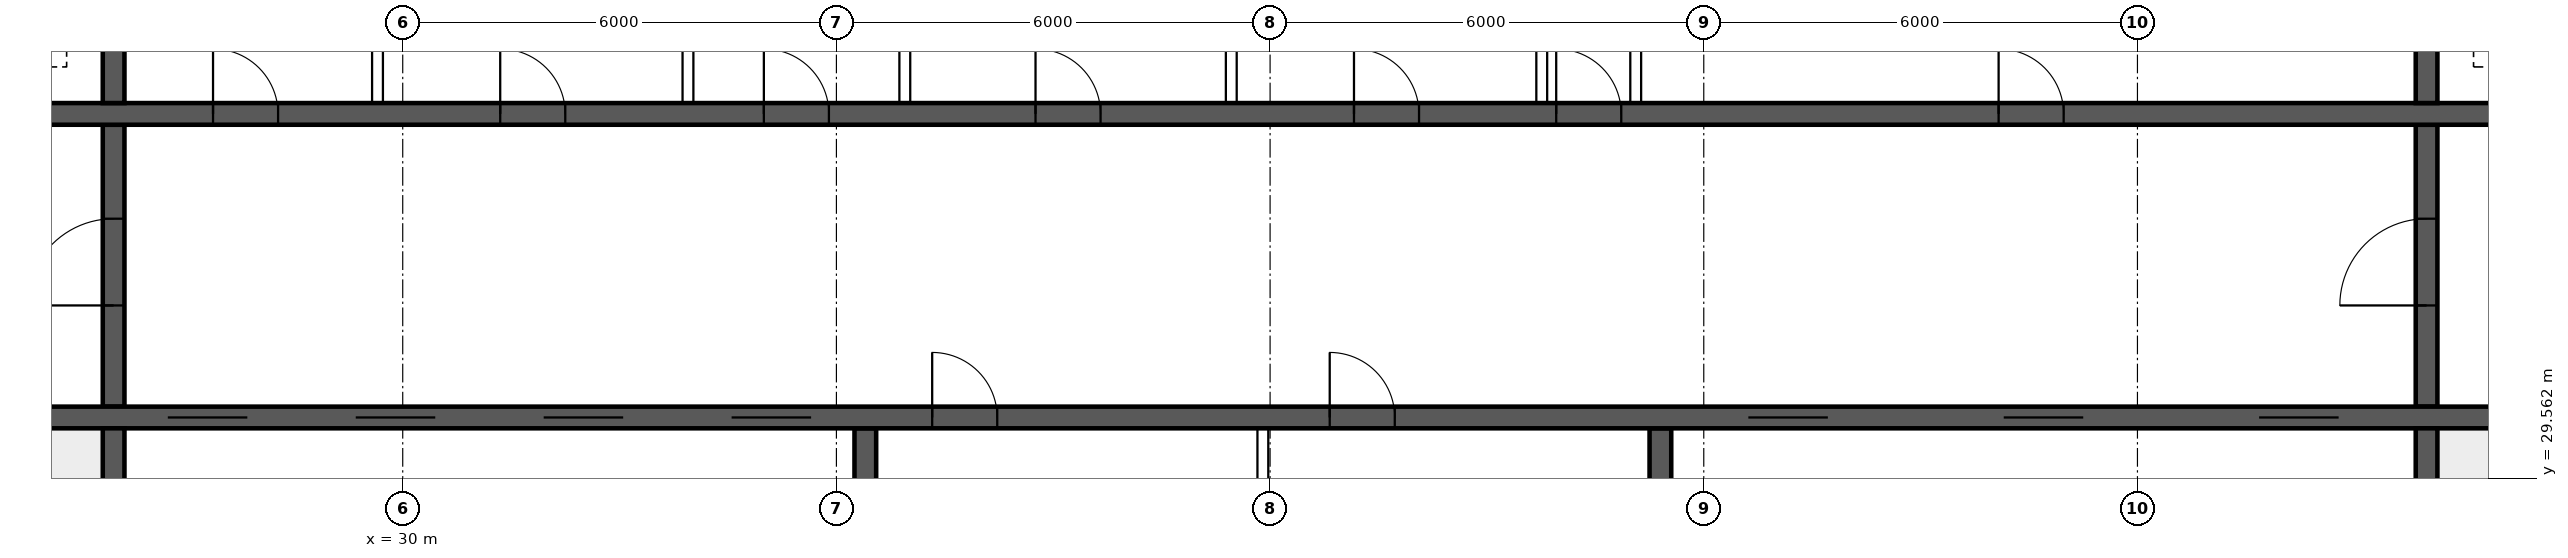
"""IFC4 building model, lengths in metres.
Left out: names, types, materials, properties, quantities, classifications, styles, units other than length and angle.
Written with IfcOpenShell. Run it as: python <this file> out.ifc"""

import sys

from ifc_helpers import new_model, si_unit, direction, frame, frame_2d, origin, place, context, subcontext, project, spatial, rectangle, extrude, element, fill, save


model = new_model("IFC4")
c1 = context("Model", 3, precision=1e-05, world=origin(), true_north=direction((0.0, 1.0)))
c2 = subcontext(c1, "Body", "Model", "MODEL_VIEW")
j1 = project(units=[si_unit("LENGTHUNIT", "METRE"), si_unit("PLANEANGLEUNIT", "RADIAN")], contexts=[c1])
p1 = place(None, origin())
s1 = spatial("IfcSite", under=j1, at=p1, CompositionType="ELEMENT")
p2 = place(p1, origin())
s2 = spatial("IfcBuilding", under=s1, at=p2, CompositionType="ELEMENT")
p3 = place(p2, frame((0.0, 0.0, 227.8)))
s3 = spatial("IfcBuildingStorey", under=s2, at=p3, CompositionType="ELEMENT", Elevation=227.8)
p4 = place(p3, frame((18.35, 30.4, 0.0), z_axis=(0.0, 0.0, 1.0), x_axis=(1.0, 0.0, 0.0)))
e1 = element("IfcWall", 1, at=p4, inside=s3, PredefinedType="SHEAR", context=c2, shape_type="SweptSolid", body=[
    extrude(rectangle(XDim=47.3, YDim=0.3, at=frame_2d((23.65, 0.0))), origin(), (0.0, 0.0, 1.0), 3.75),
])
p5 = place(p4, frame((0.4, 0.0, 0.0)))
e2 = element("IfcOpeningElement", 2, at=p5, cuts=e1, PredefinedType="OPENING", context=c2, shape_type="SweptSolid", body=[
    extrude(rectangle(XDim=1.0, YDim=2.1, at=frame_2d((0.5, 1.05))), frame((0.0, 0.16, 0.0), z_axis=(0.0, -1.0, 0.0), x_axis=(1.0, 0.0, 0.0)), (0.0, 0.0, 1.0), 0.32),
])
p6 = place(p4, frame((45.9, 0.0, 0.0)))
e3 = element("IfcOpeningElement", 3, at=p6, cuts=e1, PredefinedType="OPENING", context=c2, shape_type="SweptSolid", body=[
    extrude(rectangle(XDim=1.0, YDim=2.1, at=frame_2d((0.5, 1.05))), frame((0.0, 0.16, 0.0), z_axis=(0.0, -1.0, 0.0), x_axis=(1.0, 0.0, 0.0)), (0.0, 0.0, 1.0), 0.32),
])
p7 = place(p4, frame((8.4, 0.0, 0.0)))
e4 = element("IfcOpeningElement", 4, at=p7, cuts=e1, PredefinedType="OPENING", context=c2, shape_type="SweptSolid", body=[
    extrude(rectangle(XDim=1.1, YDim=2.1, at=frame_2d((0.55, 1.05))), frame((0.0, 0.16, 0.0), z_axis=(0.0, -1.0, 0.0), x_axis=(1.0, 0.0, 0.0)), (0.0, 0.0, 1.0), 0.32),
])
p8 = place(p4, frame((11.0, 0.0, 0.0)))
e5 = element("IfcOpeningElement", 5, at=p8, cuts=e1, PredefinedType="OPENING", context=c2, shape_type="SweptSolid", body=[
    extrude(rectangle(XDim=1.1, YDim=2.1, at=frame_2d((0.55, 1.05))), frame((0.0, 0.16, 0.0), z_axis=(0.0, -1.0, 0.0), x_axis=(1.0, 0.0, 0.0)), (0.0, 0.0, 1.0), 0.32),
])
p9 = place(p4, frame((13.6, 0.0, 0.0)))
e6 = element("IfcOpeningElement", 6, at=p9, cuts=e1, PredefinedType="OPENING", context=c2, shape_type="SweptSolid", body=[
    extrude(rectangle(XDim=1.1, YDim=2.1, at=frame_2d((0.55, 1.05))), frame((0.0, 0.16, 0.0), z_axis=(0.0, -1.0, 0.0), x_axis=(1.0, 0.0, 0.0)), (0.0, 0.0, 1.0), 0.32),
])
p10 = place(p4, frame((16.2, 0.0, 0.0)))
e7 = element("IfcOpeningElement", 7, at=p10, cuts=e1, PredefinedType="OPENING", context=c2, shape_type="SweptSolid", body=[
    extrude(rectangle(XDim=1.1, YDim=2.1, at=frame_2d((0.55, 1.05))), frame((0.0, 0.16, 0.0), z_axis=(0.0, -1.0, 0.0), x_axis=(1.0, 0.0, 0.0)), (0.0, 0.0, 1.0), 0.32),
])
p11 = place(p4, frame((18.975, 0.0, 0.0)))
e8 = element("IfcOpeningElement", 8, at=p11, cuts=e1, PredefinedType="OPENING", context=c2, shape_type="SweptSolid", body=[
    extrude(rectangle(XDim=0.9, YDim=2.1, at=frame_2d((0.45, 1.05))), frame((0.0, 0.16, 0.0), z_axis=(0.0, -1.0, 0.0), x_axis=(1.0, 0.0, 0.0)), (0.0, 0.0, 1.0), 0.32),
])
p12 = place(p4, frame((24.475, 0.0, 0.0)))
e9 = element("IfcOpeningElement", 9, at=p12, cuts=e1, PredefinedType="OPENING", context=c2, shape_type="SweptSolid", body=[
    extrude(rectangle(XDim=0.9, YDim=2.1, at=frame_2d((0.45, 1.05))), frame((0.0, 0.16, 0.0), z_axis=(0.0, -1.0, 0.0), x_axis=(1.0, 0.0, 0.0)), (0.0, 0.0, 1.0), 0.32),
])
p13 = place(p4, frame((30.267, 0.0, 0.0)))
e10 = element("IfcOpeningElement", 10, at=p13, cuts=e1, PredefinedType="OPENING", context=c2, shape_type="SweptSolid", body=[
    extrude(rectangle(XDim=1.1, YDim=2.1, at=frame_2d((0.55, 1.05))), frame((0.0, 0.16, 0.0), z_axis=(0.0, -1.0, 0.0), x_axis=(1.0, 0.0, 0.0)), (0.0, 0.0, 1.0), 0.32),
])
p14 = place(p4, frame((33.8, 0.0, 0.0)))
e11 = element("IfcOpeningElement", 11, at=p14, cuts=e1, PredefinedType="OPENING", context=c2, shape_type="SweptSolid", body=[
    extrude(rectangle(XDim=1.1, YDim=2.1, at=frame_2d((0.55, 1.05))), frame((0.0, 0.16, 0.0), z_axis=(0.0, -1.0, 0.0), x_axis=(1.0, 0.0, 0.0)), (0.0, 0.0, 1.0), 0.32),
])
p15 = place(p4, frame((37.333, 0.0, 0.0)))
e12 = element("IfcOpeningElement", 12, at=p15, cuts=e1, PredefinedType="OPENING", context=c2, shape_type="SweptSolid", body=[
    extrude(rectangle(XDim=1.1, YDim=2.1, at=frame_2d((0.55, 1.05))), frame((0.0, 0.16, 0.0), z_axis=(0.0, -1.0, 0.0), x_axis=(1.0, 0.0, 0.0)), (0.0, 0.0, 1.0), 0.32),
])
p16 = place(p3, frame((18.35, 34.6, 0.0), z_axis=(0.0, 0.0, 1.0), x_axis=(1.0, 0.0, 0.0)))
e13 = element("IfcWall", 13, at=p16, inside=s3, PredefinedType="SHEAR", context=c2, shape_type="SweptSolid", body=[
    extrude(rectangle(XDim=47.3, YDim=0.3, at=frame_2d((23.65, 0.0))), origin(), (0.0, 0.0, 1.0), 3.75),
])
p17 = place(p16, frame((0.9, 0.0, 0.0)))
e14 = element("IfcOpeningElement", 14, at=p17, cuts=e13, PredefinedType="OPENING", context=c2, shape_type="SweptSolid", body=[
    extrude(rectangle(XDim=1.1, YDim=2.1, at=frame_2d((0.55, 1.05))), frame((0.0, 0.16, 0.0), z_axis=(0.0, -1.0, 0.0), x_axis=(1.0, 0.0, 0.0)), (0.0, 0.0, 1.0), 0.32),
])
p18 = place(p16, frame((45.3, 0.0, 0.0)))
e15 = element("IfcOpeningElement", 15, at=p18, cuts=e13, PredefinedType="OPENING", context=c2, shape_type="SweptSolid", body=[
    extrude(rectangle(XDim=1.1, YDim=2.1, at=frame_2d((0.55, 1.05))), frame((0.0, 0.16, 0.0), z_axis=(0.0, -1.0, 0.0), x_axis=(1.0, 0.0, 0.0)), (0.0, 0.0, 1.0), 0.32),
])
p19 = place(p16, frame((4.25, 0.0, 0.0)))
e16 = element("IfcOpeningElement", 16, at=p19, cuts=e13, PredefinedType="OPENING", context=c2, shape_type="SweptSolid", body=[
    extrude(rectangle(XDim=0.9, YDim=2.1, at=frame_2d((0.45, 1.05))), frame((0.0, 0.16, 0.0), z_axis=(0.0, -1.0, 0.0), x_axis=(1.0, 0.0, 0.0)), (0.0, 0.0, 1.0), 0.32),
])
p20 = place(p16, frame((42.15, 0.0, 0.0)))
e17 = element("IfcOpeningElement", 17, at=p20, cuts=e13, PredefinedType="OPENING", context=c2, shape_type="SweptSolid", body=[
    extrude(rectangle(XDim=0.9, YDim=2.1, at=frame_2d((0.45, 1.05))), frame((0.0, 0.16, 0.0), z_axis=(0.0, -1.0, 0.0), x_axis=(1.0, 0.0, 0.0)), (0.0, 0.0, 1.0), 0.32),
])
p21 = place(p16, frame((9.025, 0.0, 0.0)))
e18 = element("IfcOpeningElement", 18, at=p21, cuts=e13, PredefinedType="OPENING", context=c2, shape_type="SweptSolid", body=[
    extrude(rectangle(XDim=0.9, YDim=2.1, at=frame_2d((0.45, 1.05))), frame((0.0, 0.16, 0.0), z_axis=(0.0, -1.0, 0.0), x_axis=(1.0, 0.0, 0.0)), (0.0, 0.0, 1.0), 0.32),
])
p22 = place(p16, frame((12.999, 0.0, 0.0)))
e19 = element("IfcOpeningElement", 19, at=p22, cuts=e13, PredefinedType="OPENING", context=c2, shape_type="SweptSolid", body=[
    extrude(rectangle(XDim=0.9, YDim=2.1, at=frame_2d((0.45, 1.05))), frame((0.0, 0.16, 0.0), z_axis=(0.0, -1.0, 0.0), x_axis=(1.0, 0.0, 0.0)), (0.0, 0.0, 1.0), 0.32),
])
p23 = place(p16, frame((16.646, 0.0, 0.0)))
e20 = element("IfcOpeningElement", 20, at=p23, cuts=e13, PredefinedType="OPENING", context=c2, shape_type="SweptSolid", body=[
    extrude(rectangle(XDim=0.9, YDim=2.1, at=frame_2d((0.45, 1.05))), frame((0.0, 0.16, 0.0), z_axis=(0.0, -1.0, 0.0), x_axis=(1.0, 0.0, 0.0)), (0.0, 0.0, 1.0), 0.32),
])
p24 = place(p16, frame((20.405, 0.0, 0.0)))
e21 = element("IfcOpeningElement", 21, at=p24, cuts=e13, PredefinedType="OPENING", context=c2, shape_type="SweptSolid", body=[
    extrude(rectangle(XDim=0.9, YDim=2.1, at=frame_2d((0.45, 1.05))), frame((0.0, 0.16, 0.0), z_axis=(0.0, -1.0, 0.0), x_axis=(1.0, 0.0, 0.0)), (0.0, 0.0, 1.0), 0.32),
])
p25 = place(p16, frame((24.811, 0.0, 0.0)))
e22 = element("IfcOpeningElement", 22, at=p25, cuts=e13, PredefinedType="OPENING", context=c2, shape_type="SweptSolid", body=[
    extrude(rectangle(XDim=0.9, YDim=2.1, at=frame_2d((0.45, 1.05))), frame((0.0, 0.16, 0.0), z_axis=(0.0, -1.0, 0.0), x_axis=(1.0, 0.0, 0.0)), (0.0, 0.0, 1.0), 0.32),
])
p26 = place(p16, frame((27.608, 0.0, 0.0)))
e23 = element("IfcOpeningElement", 23, at=p26, cuts=e13, PredefinedType="OPENING", context=c2, shape_type="SweptSolid", body=[
    extrude(rectangle(XDim=0.9, YDim=2.1, at=frame_2d((0.45, 1.05))), frame((0.0, 0.16, 0.0), z_axis=(0.0, -1.0, 0.0), x_axis=(1.0, 0.0, 0.0)), (0.0, 0.0, 1.0), 0.32),
])
p27 = place(p16, frame((33.729, 0.0, 0.0)))
e24 = element("IfcOpeningElement", 24, at=p27, cuts=e13, PredefinedType="OPENING", context=c2, shape_type="SweptSolid", body=[
    extrude(rectangle(XDim=0.9, YDim=2.1, at=frame_2d((0.45, 1.05))), frame((0.0, 0.16, 0.0), z_axis=(0.0, -1.0, 0.0), x_axis=(1.0, 0.0, 0.0)), (0.0, 0.0, 1.0), 0.32),
])
for number, where, z_axis, x_axis in (
    (25, (26.0, 26.15, 0.0), (0.0, 0.0, 1.0), (0.0, 1.0, 0.0)),
    (26, (58.0, 26.15, 0.0), (0.0, 0.0, 1.0), (0.0, 1.0, 0.0)),
):
    element("IfcWall", number, at=place(p3, frame(where, z_axis=z_axis, x_axis=x_axis)), inside=s3, PredefinedType="SHEAR", context=c2, shape_type="SweptSolid", body=[
        extrude(rectangle(XDim=4.1, YDim=0.3, at=frame_2d((2.05, 0.0))), origin(), (0.0, 0.0, 1.0), 3.75),
    ])
p28 = place(p3, frame((26.0, 30.55, 0.0), z_axis=(0.0, 0.0, 1.0), x_axis=(0.0, 1.0, 0.0)))
e27 = element("IfcWall", 27, at=p28, inside=s3, PredefinedType="SHEAR", context=c2, shape_type="SweptSolid", body=[
    extrude(rectangle(XDim=3.9, YDim=0.3, at=frame_2d((1.95, 0.0))), origin(), (0.0, 0.0, 1.0), 3.75),
])
p29 = place(p28, frame((1.4, 0.0, 0.0)))
e28 = element("IfcOpeningElement", 28, at=p29, cuts=e27, PredefinedType="OPENING", context=c2, shape_type="SweptSolid", body=[
    extrude(rectangle(XDim=1.2, YDim=2.1, at=frame_2d((0.6, 1.05))), frame((0.0, 0.16, 0.0), z_axis=(0.0, -1.0, 0.0), x_axis=(1.0, 0.0, 0.0)), (0.0, 0.0, 1.0), 0.32),
])
p30 = place(p3, frame((58.0, 30.55, 0.0), z_axis=(0.0, 0.0, 1.0), x_axis=(0.0, 1.0, 0.0)))
e29 = element("IfcWall", 29, at=p30, inside=s3, PredefinedType="SHEAR", context=c2, shape_type="SweptSolid", body=[
    extrude(rectangle(XDim=3.9, YDim=0.3, at=frame_2d((1.95, 0.0))), origin(), (0.0, 0.0, 1.0), 3.75),
])
p31 = place(p30, frame((1.4, 0.0, 0.0)))
e30 = element("IfcOpeningElement", 30, at=p31, cuts=e29, PredefinedType="OPENING", context=c2, shape_type="SweptSolid", body=[
    extrude(rectangle(XDim=1.2, YDim=2.1, at=frame_2d((0.6, 1.05))), frame((0.0, 0.16, 0.0), z_axis=(0.0, -1.0, 0.0), x_axis=(1.0, 0.0, 0.0)), (0.0, 0.0, 1.0), 0.32),
])
for number, where, z_axis, x_axis in (
    (31, (26.0, 34.75, 0.0), (0.0, 0.0, 1.0), (0.0, 1.0, 0.0)),
    (32, (58.0, 34.75, 0.0), (0.0, 0.0, 1.0), (0.0, 1.0, 0.0)),
):
    element("IfcWall", number, at=place(p3, frame(where, z_axis=z_axis, x_axis=x_axis)), inside=s3, PredefinedType="SHEAR", context=c2, shape_type="SweptSolid", body=[
        extrude(rectangle(XDim=3.1, YDim=0.3, at=frame_2d((1.55, 0.0))), origin(), (0.0, 0.0, 1.0), 3.75),
    ])
for number, where, z_axis, x_axis in (
    (33, (36.4, 26.15, 0.0), (0.0, 0.0, 1.0), (0.0, 1.0, 0.0)),
    (34, (47.4, 26.15, 0.0), (0.0, 0.0, 1.0), (0.0, 1.0, 0.0)),
):
    element("IfcWall", number, at=place(p3, frame(where, z_axis=z_axis, x_axis=x_axis)), inside=s3, PredefinedType="SHEAR", context=c2, shape_type="SweptSolid", body=[
        extrude(rectangle(XDim=4.1, YDim=0.3, at=frame_2d((2.05, 0.0))), origin(), (0.0, 0.0, 1.0), 3.75),
    ])
for number, where, z_axis, x_axis in (
    (35, (29.651, 34.75, 0.0), (0.0, 0.0, 1.0), (0.0, 1.0, 0.0)),
    (36, (33.946, 34.75, 0.0), (0.0, 0.0, 1.0), (0.0, 1.0, 0.0)),
    (37, (36.946, 34.75, 0.0), (0.0, 0.0, 1.0), (0.0, 1.0, 0.0)),
    (38, (41.463, 34.75, 0.0), (0.0, 0.0, 1.0), (0.0, 1.0, 0.0)),
    (39, (45.758, 34.75, 0.0), (0.0, 0.0, 1.0), (0.0, 1.0, 0.0)),
    (40, (47.058, 34.75, 0.0), (0.0, 0.0, 1.0), (0.0, 1.0, 0.0)),
):
    element("IfcWall", number, at=place(p3, frame(where, z_axis=z_axis, x_axis=x_axis)), inside=s3, PredefinedType="SOLIDWALL", context=c2, shape_type="SweptSolid", body=[
        extrude(rectangle(XDim=3.1, YDim=0.15, at=frame_2d((1.55, 0.0))), origin(), (0.0, 0.0, 1.0), 3.3),
    ])
p32 = place(p3, frame((41.9, 26.15, 0.0), z_axis=(0.0, 0.0, 1.0), x_axis=(0.0, 1.0, 0.0)))
e41 = element("IfcWall", 41, at=p32, inside=s3, PredefinedType="SOLIDWALL", context=c2, shape_type="SweptSolid", body=[
    extrude(rectangle(XDim=4.1, YDim=0.15, at=frame_2d((2.05, 0.0))), origin(), (0.0, 0.0, 1.0), 3.3),
])
p33 = place(p29, origin())
e42 = element("IfcDoor", 42, at=p33, inside=s3, OperationType="SINGLE_SWING_LEFT", PredefinedType="DOOR", context=c2, shape_type="SweptSolid", body=[
    extrude(rectangle(XDim=1.2, YDim=2.1, at=frame_2d((0.6, 1.05))), frame((0.0, 0.025, 0.0), z_axis=(0.0, -1.0, 0.0), x_axis=(1.0, 0.0, 0.0)), (0.0, 0.0, 1.0), 0.05),
])
fill(e28, e42)
p34 = place(p31, origin())
e43 = element("IfcDoor", 43, at=p34, inside=s3, OperationType="SINGLE_SWING_LEFT", PredefinedType="DOOR", context=c2, shape_type="SweptSolid", body=[
    extrude(rectangle(XDim=1.2, YDim=2.1, at=frame_2d((0.6, 1.05))), frame((0.0, 0.025, 0.0), z_axis=(0.0, -1.0, 0.0), x_axis=(1.0, 0.0, 0.0)), (0.0, 0.0, 1.0), 0.05),
])
fill(e30, e43)
p35 = place(p21, origin())
e44 = element("IfcDoor", 44, at=p35, inside=s3, OperationType="SINGLE_SWING_LEFT", PredefinedType="DOOR", context=c2, shape_type="SweptSolid", body=[
    extrude(rectangle(XDim=0.9, YDim=2.1, at=frame_2d((0.45, 1.05))), frame((0.0, 0.025, 0.0), z_axis=(0.0, -1.0, 0.0), x_axis=(1.0, 0.0, 0.0)), (0.0, 0.0, 1.0), 0.05),
])
fill(e18, e44)
p36 = place(p22, origin())
e45 = element("IfcDoor", 45, at=p36, inside=s3, OperationType="SINGLE_SWING_LEFT", PredefinedType="DOOR", context=c2, shape_type="SweptSolid", body=[
    extrude(rectangle(XDim=0.9, YDim=2.1, at=frame_2d((0.45, 1.05))), frame((0.0, 0.025, 0.0), z_axis=(0.0, -1.0, 0.0), x_axis=(1.0, 0.0, 0.0)), (0.0, 0.0, 1.0), 0.05),
])
fill(e19, e45)
p37 = place(p23, origin())
e46 = element("IfcDoor", 46, at=p37, inside=s3, OperationType="SINGLE_SWING_LEFT", PredefinedType="DOOR", context=c2, shape_type="SweptSolid", body=[
    extrude(rectangle(XDim=0.9, YDim=2.1, at=frame_2d((0.45, 1.05))), frame((0.0, 0.025, 0.0), z_axis=(0.0, -1.0, 0.0), x_axis=(1.0, 0.0, 0.0)), (0.0, 0.0, 1.0), 0.05),
])
fill(e20, e46)
p38 = place(p24, origin())
e47 = element("IfcDoor", 47, at=p38, inside=s3, OperationType="SINGLE_SWING_LEFT", PredefinedType="DOOR", context=c2, shape_type="SweptSolid", body=[
    extrude(rectangle(XDim=0.9, YDim=2.1, at=frame_2d((0.45, 1.05))), frame((0.0, 0.025, 0.0), z_axis=(0.0, -1.0, 0.0), x_axis=(1.0, 0.0, 0.0)), (0.0, 0.0, 1.0), 0.05),
])
fill(e21, e47)
p39 = place(p25, origin())
e48 = element("IfcDoor", 48, at=p39, inside=s3, OperationType="SINGLE_SWING_LEFT", PredefinedType="DOOR", context=c2, shape_type="SweptSolid", body=[
    extrude(rectangle(XDim=0.9, YDim=2.1, at=frame_2d((0.45, 1.05))), frame((0.0, 0.025, 0.0), z_axis=(0.0, -1.0, 0.0), x_axis=(1.0, 0.0, 0.0)), (0.0, 0.0, 1.0), 0.05),
])
fill(e22, e48)
p40 = place(p26, origin())
e49 = element("IfcDoor", 49, at=p40, inside=s3, OperationType="SINGLE_SWING_LEFT", PredefinedType="DOOR", context=c2, shape_type="SweptSolid", body=[
    extrude(rectangle(XDim=0.9, YDim=2.1, at=frame_2d((0.45, 1.05))), frame((0.0, 0.025, 0.0), z_axis=(0.0, -1.0, 0.0), x_axis=(1.0, 0.0, 0.0)), (0.0, 0.0, 1.0), 0.05),
])
fill(e23, e49)
p41 = place(p27, origin())
e50 = element("IfcDoor", 50, at=p41, inside=s3, OperationType="SINGLE_SWING_LEFT", PredefinedType="DOOR", context=c2, shape_type="SweptSolid", body=[
    extrude(rectangle(XDim=0.9, YDim=2.1, at=frame_2d((0.45, 1.05))), frame((0.0, 0.025, 0.0), z_axis=(0.0, -1.0, 0.0), x_axis=(1.0, 0.0, 0.0)), (0.0, 0.0, 1.0), 0.05),
])
fill(e24, e50)
p42 = place(p7, origin())
e51 = element("IfcDoor", 51, at=p42, inside=s3, OperationType="DOUBLE_DOOR_SLIDING", PredefinedType="DOOR", context=c2, shape_type="SweptSolid", body=[
    extrude(rectangle(XDim=1.1, YDim=2.1, at=frame_2d((0.55, 1.05))), frame((0.0, 0.025, 0.0), z_axis=(0.0, -1.0, 0.0), x_axis=(1.0, 0.0, 0.0)), (0.0, 0.0, 1.0), 0.05),
])
fill(e4, e51)
p43 = place(p8, origin())
e52 = element("IfcDoor", 52, at=p43, inside=s3, OperationType="DOUBLE_DOOR_SLIDING", PredefinedType="DOOR", context=c2, shape_type="SweptSolid", body=[
    extrude(rectangle(XDim=1.1, YDim=2.1, at=frame_2d((0.55, 1.05))), frame((0.0, 0.025, 0.0), z_axis=(0.0, -1.0, 0.0), x_axis=(1.0, 0.0, 0.0)), (0.0, 0.0, 1.0), 0.05),
])
fill(e5, e52)
p44 = place(p9, origin())
e53 = element("IfcDoor", 53, at=p44, inside=s3, OperationType="DOUBLE_DOOR_SLIDING", PredefinedType="DOOR", context=c2, shape_type="SweptSolid", body=[
    extrude(rectangle(XDim=1.1, YDim=2.1, at=frame_2d((0.55, 1.05))), frame((0.0, 0.025, 0.0), z_axis=(0.0, -1.0, 0.0), x_axis=(1.0, 0.0, 0.0)), (0.0, 0.0, 1.0), 0.05),
])
fill(e6, e53)
p45 = place(p10, origin())
e54 = element("IfcDoor", 54, at=p45, inside=s3, OperationType="DOUBLE_DOOR_SLIDING", PredefinedType="DOOR", context=c2, shape_type="SweptSolid", body=[
    extrude(rectangle(XDim=1.1, YDim=2.1, at=frame_2d((0.55, 1.05))), frame((0.0, 0.025, 0.0), z_axis=(0.0, -1.0, 0.0), x_axis=(1.0, 0.0, 0.0)), (0.0, 0.0, 1.0), 0.05),
])
fill(e7, e54)
p46 = place(p11, origin())
e55 = element("IfcDoor", 55, at=p46, inside=s3, OperationType="SINGLE_SWING_LEFT", PredefinedType="DOOR", context=c2, shape_type="SweptSolid", body=[
    extrude(rectangle(XDim=0.9, YDim=2.1, at=frame_2d((0.45, 1.05))), frame((0.0, 0.025, 0.0), z_axis=(0.0, -1.0, 0.0), x_axis=(1.0, 0.0, 0.0)), (0.0, 0.0, 1.0), 0.05),
])
fill(e8, e55)
p47 = place(p12, origin())
e56 = element("IfcDoor", 56, at=p47, inside=s3, OperationType="SINGLE_SWING_LEFT", PredefinedType="DOOR", context=c2, shape_type="SweptSolid", body=[
    extrude(rectangle(XDim=0.9, YDim=2.1, at=frame_2d((0.45, 1.05))), frame((0.0, 0.025, 0.0), z_axis=(0.0, -1.0, 0.0), x_axis=(1.0, 0.0, 0.0)), (0.0, 0.0, 1.0), 0.05),
])
fill(e9, e56)
p48 = place(p13, origin())
e57 = element("IfcDoor", 57, at=p48, inside=s3, OperationType="DOUBLE_DOOR_SLIDING", PredefinedType="DOOR", context=c2, shape_type="SweptSolid", body=[
    extrude(rectangle(XDim=1.1, YDim=2.1, at=frame_2d((0.55, 1.05))), frame((0.0, 0.025, 0.0), z_axis=(0.0, -1.0, 0.0), x_axis=(1.0, 0.0, 0.0)), (0.0, 0.0, 1.0), 0.05),
])
fill(e10, e57)
p49 = place(p14, origin())
e58 = element("IfcDoor", 58, at=p49, inside=s3, OperationType="DOUBLE_DOOR_SLIDING", PredefinedType="DOOR", context=c2, shape_type="SweptSolid", body=[
    extrude(rectangle(XDim=1.1, YDim=2.1, at=frame_2d((0.55, 1.05))), frame((0.0, 0.025, 0.0), z_axis=(0.0, -1.0, 0.0), x_axis=(1.0, 0.0, 0.0)), (0.0, 0.0, 1.0), 0.05),
])
fill(e11, e58)
p50 = place(p15, origin())
e59 = element("IfcDoor", 59, at=p50, inside=s3, OperationType="DOUBLE_DOOR_SLIDING", PredefinedType="DOOR", context=c2, shape_type="SweptSolid", body=[
    extrude(rectangle(XDim=1.1, YDim=2.1, at=frame_2d((0.55, 1.05))), frame((0.0, 0.025, 0.0), z_axis=(0.0, -1.0, 0.0), x_axis=(1.0, 0.0, 0.0)), (0.0, 0.0, 1.0), 0.05),
])
fill(e12, e59)
save(model, sys.argv[1])
